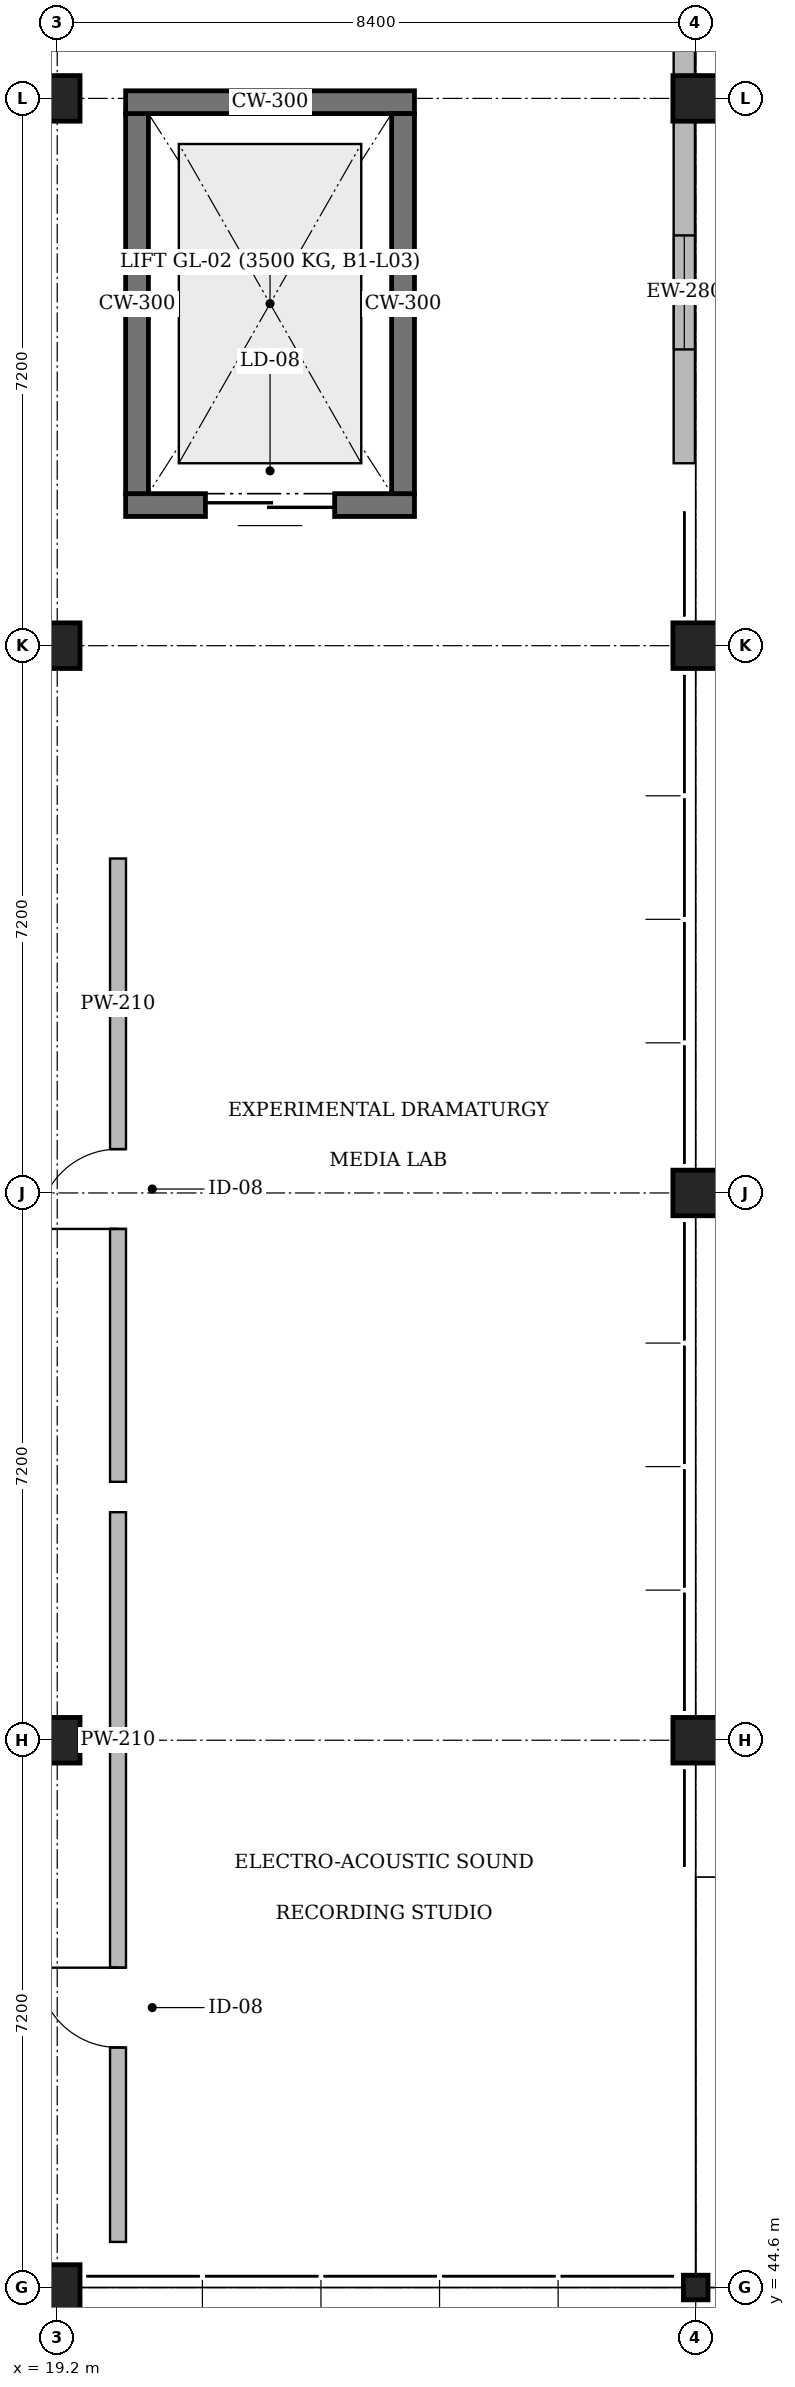
"""IFC4 building model, lengths in metres.
Left out: names, types, materials, properties, quantities, classifications, styles, units other than length and angle.
Written with IfcOpenShell. Run it as: python <this file> out.ifc"""

import sys

from ifc_helpers import new_model, si_unit, direction, frame, frame_2d, origin, origin_2d, place, context, subcontext, project, spatial, rectangle, hollow_circle, extrude, element, fill, save


model = new_model("IFC4")
c1 = context("Model", 3, precision=1e-05, world=origin(), true_north=direction((0.0, 1.0)))
c2 = subcontext(c1, "Body", "Model", "MODEL_VIEW")
j1 = project(units=[si_unit("LENGTHUNIT", "METRE"), si_unit("PLANEANGLEUNIT", "RADIAN")], contexts=[c1])
p1 = place(None, origin())
s1 = spatial("IfcSite", under=j1, at=p1, CompositionType="ELEMENT")
p2 = place(p1, origin())
s2 = spatial("IfcBuilding", under=s1, at=p2, CompositionType="ELEMENT")
p3 = place(p2, frame((0.0, 0.0, 4.8)))
s3 = spatial("IfcBuildingStorey", under=s2, at=p3, CompositionType="ELEMENT", Elevation=4.8)
for number, where, z_axis, x_axis in (
    (1, (19.2, 44.6, 0.0), (0.0, 0.0, 1.0), (1.0, 0.0, 0.0)),
    (2, (19.2, 51.8, 0.0), (0.0, 0.0, 1.0), (1.0, 0.0, 0.0)),
    (3, (19.2, 66.2, 0.0), (0.0, 0.0, 1.0), (1.0, 0.0, 0.0)),
    (4, (19.2, 73.4, 0.0), (0.0, 0.0, 1.0), (1.0, 0.0, 0.0)),
):
    element("IfcColumn", number, at=place(p3, frame(where, z_axis=z_axis, x_axis=x_axis)), inside=s3, PredefinedType="COLUMN", context=c2, shape_type="SweptSolid", body=[
        extrude(rectangle(XDim=0.6, YDim=0.6, at=origin_2d()), origin(), (0.0, 0.0, 1.0), 4.2),
    ])
p4 = place(p3, frame((27.6, 44.6, 0.0), z_axis=(0.0, 0.0, 1.0), x_axis=(1.0, 0.0, 0.0)))
e5 = element("IfcColumn", 5, at=p4, inside=s3, PredefinedType="COLUMN", context=c2, shape_type="SweptSolid", body=[
    extrude(hollow_circle(Radius=0.162, WallThickness=0.012, at=origin_2d()), origin(), (0.0, 0.0, 1.0), 4.2),
])
for number, where, z_axis, x_axis in (
    (6, (27.6, 51.8, 0.0), (0.0, 0.0, 1.0), (1.0, 0.0, 0.0)),
    (7, (27.6, 59.0, 0.0), (0.0, 0.0, 1.0), (1.0, 0.0, 0.0)),
    (8, (27.6, 66.2, 0.0), (0.0, 0.0, 1.0), (1.0, 0.0, 0.0)),
    (9, (27.6, 73.4, 0.0), (0.0, 0.0, 1.0), (1.0, 0.0, 0.0)),
):
    element("IfcColumn", number, at=place(p3, frame(where, z_axis=z_axis, x_axis=x_axis)), inside=s3, PredefinedType="COLUMN", context=c2, shape_type="SweptSolid", body=[
        extrude(rectangle(XDim=0.6, YDim=0.6, at=origin_2d()), origin(), (0.0, 0.0, 1.0), 4.2),
    ])
p5 = place(p3, frame((23.9, 68.05, 0.0), z_axis=(0.0, 0.0, 1.0), x_axis=(-1.0, 0.0, 0.0)))
e10 = element("IfcWall", 10, at=p5, inside=s3, PredefinedType="SOLIDWALL", context=c2, shape_type="SweptSolid", body=[
    extrude(rectangle(XDim=3.8, YDim=0.3, at=frame_2d((1.9, 0.0))), origin(), (0.0, 0.0, 1.0), 4.2),
])
p6 = place(p5, frame((1.05, 0.0, 0.0)))
e11 = element("IfcOpeningElement", 11, at=p6, cuts=e10, PredefinedType="OPENING", context=c2, shape_type="SweptSolid", body=[
    extrude(rectangle(XDim=1.7, YDim=2.4, at=frame_2d((0.85, 1.2))), frame((0.0, 0.17, 0.0), z_axis=(0.0, -1.0, 0.0), x_axis=(1.0, 0.0, 0.0)), (0.0, 0.0, 1.0), 0.34),
])
p7 = place(p3, frame((20.25, 68.2, 0.0), z_axis=(0.0, 0.0, 1.0), x_axis=(0.0, 1.0, 0.0)))
e12 = element("IfcWall", 12, at=p7, inside=s3, PredefinedType="SOLIDWALL", context=c2, shape_type="SweptSolid", body=[
    extrude(rectangle(XDim=5.0, YDim=0.3, at=frame_2d((2.5, 0.0))), origin(), (0.0, 0.0, 1.0), 4.2),
])
p8 = place(p3, frame((20.1, 73.35, 0.0), z_axis=(0.0, 0.0, 1.0), x_axis=(1.0, 0.0, 0.0)))
e13 = element("IfcWall", 13, at=p8, inside=s3, PredefinedType="SOLIDWALL", context=c2, shape_type="SweptSolid", body=[
    extrude(rectangle(XDim=3.8, YDim=0.3, at=frame_2d((1.9, 0.0))), origin(), (0.0, 0.0, 1.0), 4.2),
])
p9 = place(p3, frame((23.75, 73.2, 0.0), z_axis=(0.0, 0.0, 1.0), x_axis=(0.0, -1.0, 0.0)))
e14 = element("IfcWall", 14, at=p9, inside=s3, PredefinedType="SOLIDWALL", context=c2, shape_type="SweptSolid", body=[
    extrude(rectangle(XDim=5.0, YDim=0.3, at=frame_2d((2.5, 0.0))), origin(), (0.0, 0.0, 1.0), 4.2),
])
p10 = place(p3, frame((27.45, 68.6, 0.0), z_axis=(0.0, 0.0, 1.0), x_axis=(0.0, 1.0, 0.0)))
e15 = element("IfcWall", 15, at=p10, inside=s3, PredefinedType="SOLIDWALL", context=c2, shape_type="SweptSolid", body=[
    extrude(rectangle(XDim=4.495, YDim=0.28, at=frame_2d((2.248, 0.0))), origin(), (0.0, 0.0, 1.0), 3.653),
])
p11 = place(p10, frame((1.498, 0.0, 0.95)))
e16 = element("IfcOpeningElement", 16, at=p11, cuts=e15, PredefinedType="OPENING", context=c2, shape_type="SweptSolid", body=[
    extrude(rectangle(XDim=1.5, YDim=1.75, at=frame_2d((0.75, 0.875))), frame((0.0, 0.16, 0.0), z_axis=(0.0, -1.0, 0.0), x_axis=(1.0, 0.0, 0.0)), (0.0, 0.0, 1.0), 0.32),
])
p12 = place(p3, frame((27.45, 73.705, 0.0), z_axis=(0.0, 0.0, 1.0), x_axis=(0.0, 1.0, 0.0)))
e17 = element("IfcWall", 17, at=p12, inside=s3, PredefinedType="SOLIDWALL", context=c2, shape_type="SweptSolid", body=[
    extrude(rectangle(XDim=6.59, YDim=0.28, at=frame_2d((3.295, 0.0))), origin(), (0.0, 0.0, 1.0), 3.653),
])
p13 = place(p12, frame((1.077, 0.0, 0.95)))
e18 = element("IfcOpeningElement", 18, at=p13, cuts=e17, PredefinedType="OPENING", context=c2, shape_type="SweptSolid", body=[
    extrude(rectangle(XDim=1.14, YDim=1.6, at=frame_2d((0.57, 0.8))), frame((0.0, 0.16, 0.0), z_axis=(0.0, -1.0, 0.0), x_axis=(1.0, 0.0, 0.0)), (0.0, 0.0, 1.0), 0.32),
])
p14 = place(p12, frame((4.373, 0.0, 0.95)))
e19 = element("IfcOpeningElement", 19, at=p14, cuts=e17, PredefinedType="OPENING", context=c2, shape_type="SweptSolid", body=[
    extrude(rectangle(XDim=1.14, YDim=1.6, at=frame_2d((0.57, 0.8))), frame((0.0, 0.16, 0.0), z_axis=(0.0, -1.0, 0.0), x_axis=(1.0, 0.0, 0.0)), (0.0, 0.0, 1.0), 0.32),
])
p15 = place(p3, frame((20.0, 45.2, 0.0), z_axis=(0.0, 0.0, 1.0), x_axis=(0.0, 1.0, 0.0)))
e20 = element("IfcWall", 20, at=p15, inside=s3, PredefinedType="PARTITIONING", context=c2, shape_type="SweptSolid", body=[
    extrude(rectangle(XDim=9.6, YDim=0.21, at=frame_2d((4.8, 0.0))), origin(), (0.0, 0.0, 1.0), 3.94),
])
p16 = place(p15, frame((2.558, 0.0, 0.0)))
e21 = element("IfcOpeningElement", 21, at=p16, cuts=e20, PredefinedType="OPENING", context=c2, shape_type="SweptSolid", body=[
    extrude(rectangle(XDim=1.05, YDim=2.25, at=frame_2d((0.525, 1.125))), frame((0.0, 0.125, 0.0), z_axis=(0.0, -1.0, 0.0), x_axis=(1.0, 0.0, 0.0)), (0.0, 0.0, 1.0), 0.25),
])
p17 = place(p3, frame((20.0, 55.2, 0.0), z_axis=(0.0, 0.0, 1.0), x_axis=(0.0, 1.0, 0.0)))
e22 = element("IfcWall", 22, at=p17, inside=s3, PredefinedType="PARTITIONING", context=c2, shape_type="SweptSolid", body=[
    extrude(rectangle(XDim=8.2, YDim=0.21, at=frame_2d((4.1, 0.0))), origin(), (0.0, 0.0, 1.0), 3.94),
])
p18 = place(p17, frame((3.327, 0.0, 0.0)))
e23 = element("IfcOpeningElement", 23, at=p18, cuts=e22, PredefinedType="OPENING", context=c2, shape_type="SweptSolid", body=[
    extrude(rectangle(XDim=1.05, YDim=2.25, at=frame_2d((0.525, 1.125))), frame((0.0, 0.125, 0.0), z_axis=(0.0, -1.0, 0.0), x_axis=(1.0, 0.0, 0.0)), (0.0, 0.0, 1.0), 0.25),
])
p19 = place(p6, origin())
e24 = element("IfcDoor", 24, at=p19, inside=s3, OperationType="DOUBLE_DOOR_SLIDING", PredefinedType="DOOR", context=c2, shape_type="SweptSolid", body=[
    extrude(rectangle(XDim=1.7, YDim=2.4, at=frame_2d((0.85, 1.2))), frame((0.0, 0.025, 0.0), z_axis=(0.0, -1.0, 0.0), x_axis=(1.0, 0.0, 0.0)), (0.0, 0.0, 1.0), 0.05),
])
fill(e11, e24)
p20 = place(p11, origin())
e25 = element("IfcWindow", 25, at=p20, inside=s3, PartitioningType="SINGLE_PANEL", PredefinedType="WINDOW", context=c2, shape_type="SweptSolid", body=[
    extrude(rectangle(XDim=1.5, YDim=1.75, at=frame_2d((0.75, 0.875))), frame((0.0, 0.03, 0.0), z_axis=(0.0, -1.0, 0.0), x_axis=(1.0, 0.0, 0.0)), (0.0, 0.0, 1.0), 0.06),
])
fill(e16, e25)
p21 = place(p16, origin())
e26 = element("IfcDoor", 26, at=p21, inside=s3, OperationType="SINGLE_SWING_RIGHT", PredefinedType="DOOR", context=c2, shape_type="SweptSolid", body=[
    extrude(rectangle(XDim=1.05, YDim=2.25, at=frame_2d((0.525, 1.125))), frame((0.0, 0.025, 0.0), z_axis=(0.0, -1.0, 0.0), x_axis=(1.0, 0.0, 0.0)), (0.0, 0.0, 1.0), 0.05),
])
fill(e21, e26)
p22 = place(p18, origin())
e27 = element("IfcDoor", 27, at=p22, inside=s3, OperationType="SINGLE_SWING_LEFT", PredefinedType="DOOR", context=c2, shape_type="SweptSolid", body=[
    extrude(rectangle(XDim=1.05, YDim=2.25, at=frame_2d((0.525, 1.125))), frame((0.0, 0.025, 0.0), z_axis=(0.0, -1.0, 0.0), x_axis=(1.0, 0.0, 0.0)), (0.0, 0.0, 1.0), 0.05),
])
fill(e23, e27)
save(model, sys.argv[1])
